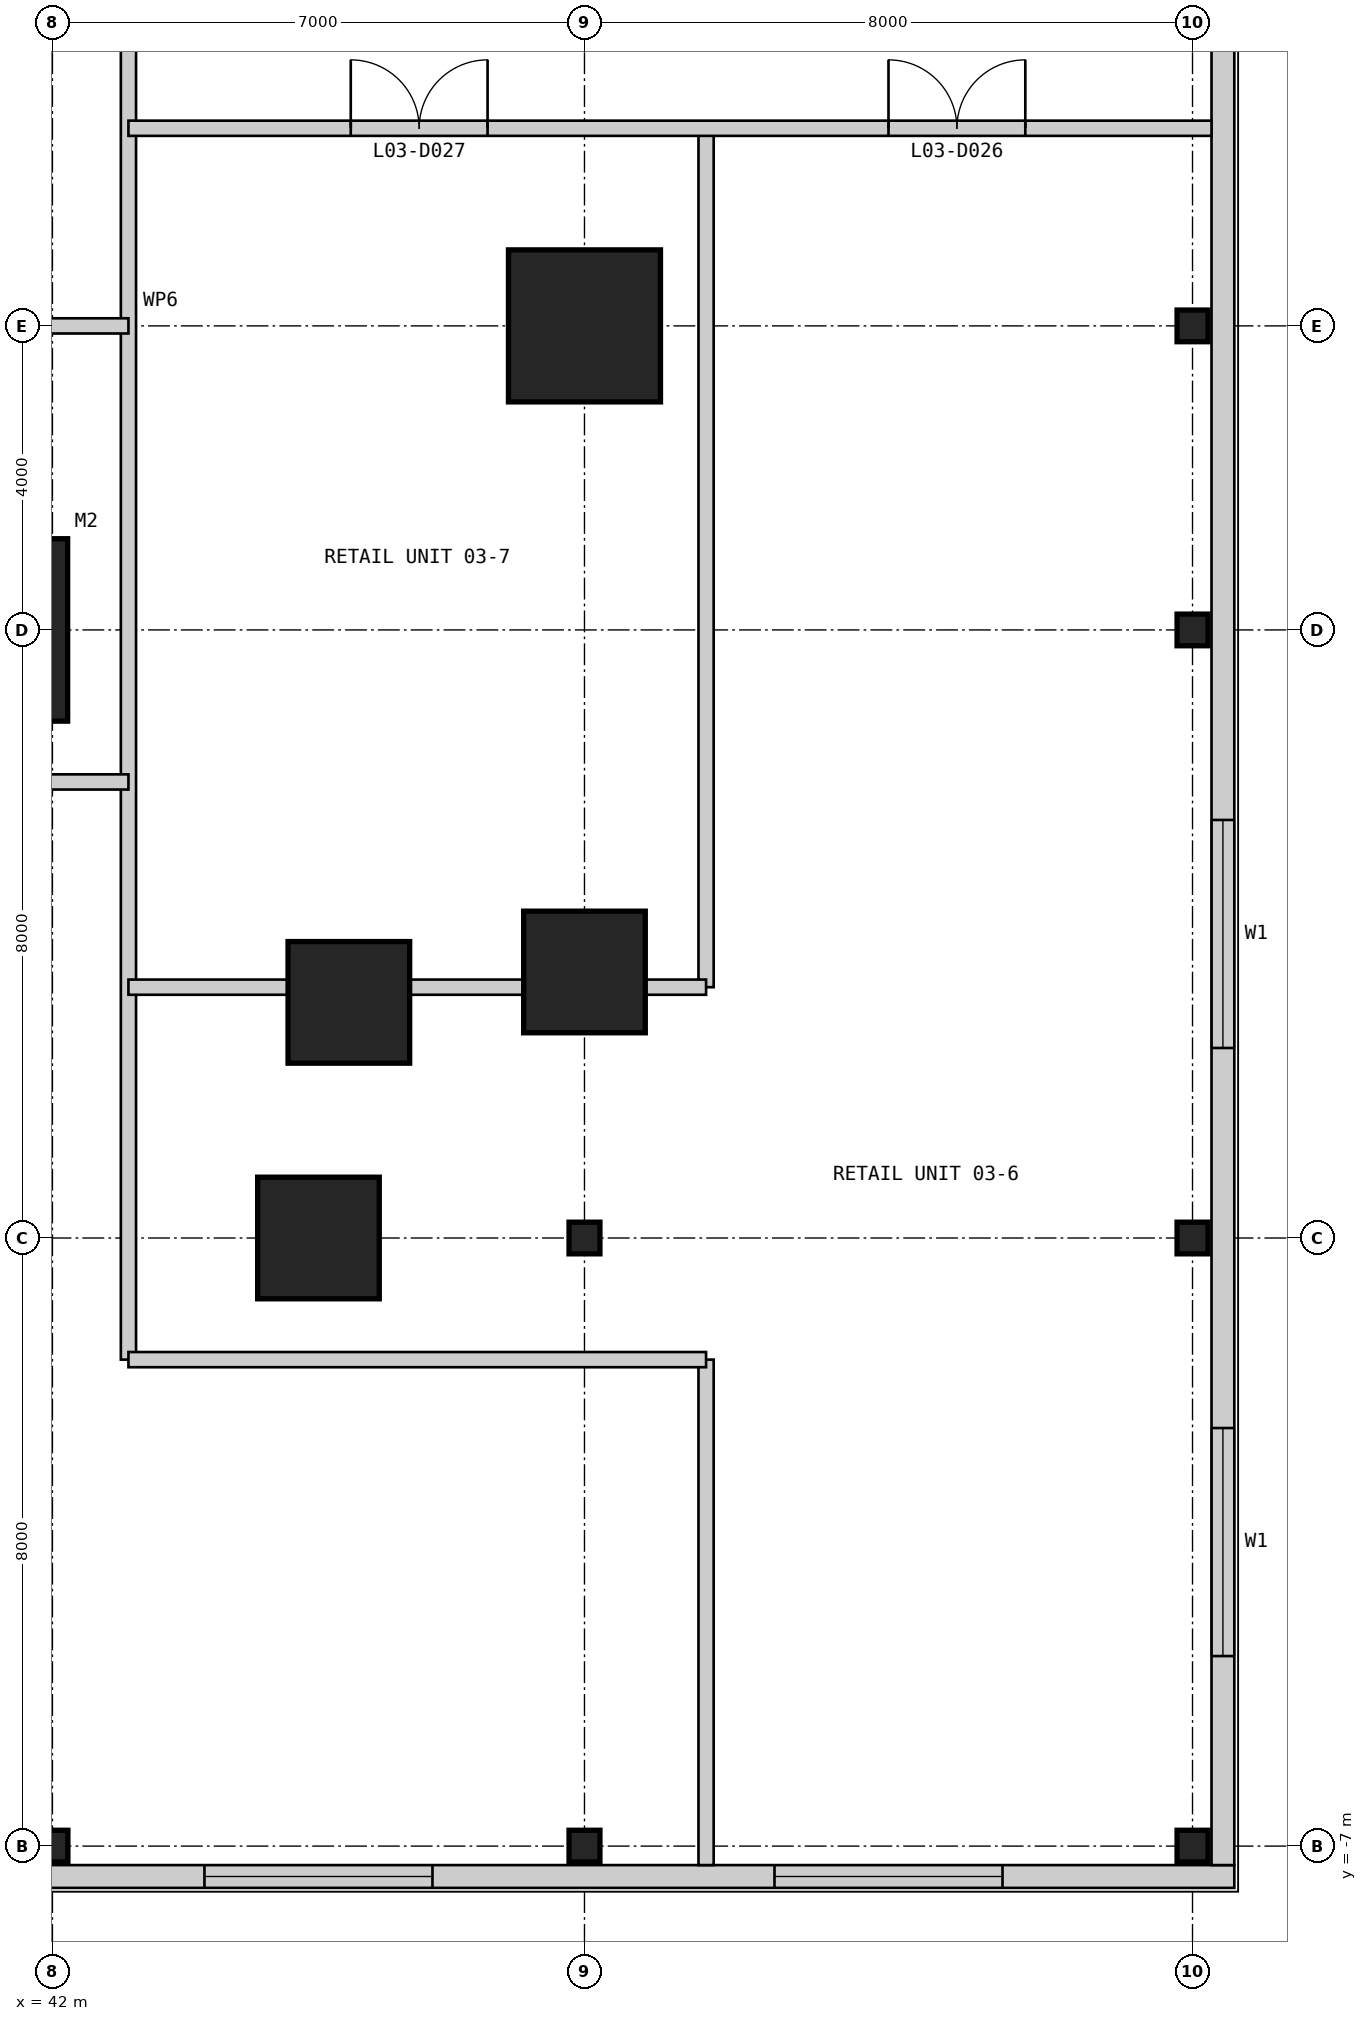
"""IFC4 building model, lengths in metres.
Left out: names, types, materials, properties, quantities, classifications, styles, units other than length and angle.
Written with IfcOpenShell. Run it as: python <this file> out.ifc"""

import sys

from ifc_helpers import new_model, si_unit, direction, frame, frame_2d, origin, origin_2d, place, context, subcontext, project, spatial, rectangle, i_section, extrude, element, fill, save


model = new_model("IFC4")
c1 = context("Model", 3, precision=1e-05, world=origin(), true_north=direction((0.0, 1.0)))
c2 = subcontext(c1, "Body", "Model", "MODEL_VIEW")
j1 = project(units=[si_unit("LENGTHUNIT", "METRE"), si_unit("PLANEANGLEUNIT", "RADIAN")], contexts=[c1])
p1 = place(None, origin())
s1 = spatial("IfcSite", under=j1, at=p1, CompositionType="ELEMENT")
p2 = place(p1, origin())
s2 = spatial("IfcBuilding", under=s1, at=p2, CompositionType="ELEMENT")
p3 = place(p2, frame((0.0, 0.0, 16.6)))
s3 = spatial("IfcBuildingStorey", under=s2, at=p3, CompositionType="ELEMENT", Elevation=16.6)
p4 = place(p3, frame((41.0, 9.0, 0.0), z_axis=(0.0, 0.0, 1.0), x_axis=(1.0, 0.0, 0.0)))
e1 = element("IfcColumn", 1, at=p4, inside=s3, PredefinedType="COLUMN", context=c2, shape_type="SweptSolid", body=[
    extrude(rectangle(XDim=2.4, YDim=2.4, at=origin_2d()), origin(), (0.0, 0.0, 1.0), 4.8),
])
for number, where, z_axis, x_axis in (
    (2, (45.5, 1.0, 0.0), (0.0, 0.0, 1.0), (1.0, 0.0, 0.0)),
    (3, (45.9, 4.1, 0.0), (0.0, 0.0, 1.0), (1.0, 0.0, 0.0)),
    (4, (49.0, 4.5, 0.0), (0.0, 0.0, 1.0), (1.0, 0.0, 0.0)),
):
    element("IfcColumn", number, at=place(p3, frame(where, z_axis=z_axis, x_axis=x_axis)), inside=s3, PredefinedType="COLUMN", context=c2, shape_type="SweptSolid", body=[
        extrude(rectangle(XDim=1.6, YDim=1.6, at=origin_2d()), origin(), (0.0, 0.0, 1.0), 4.8),
    ])
p5 = place(p3, frame((49.0, 13.0, 0.0), z_axis=(0.0, 0.0, 1.0), x_axis=(1.0, 0.0, 0.0)))
e5 = element("IfcColumn", 5, at=p5, inside=s3, PredefinedType="COLUMN", context=c2, shape_type="SweptSolid", body=[
    extrude(rectangle(XDim=2.0, YDim=2.0, at=origin_2d()), origin(), (0.0, 0.0, 1.0), 4.8),
])
for number, where, z_axis, x_axis in (
    (6, (42.0, -7.0, 0.0), (0.0, 0.0, 1.0), (1.0, 0.0, 0.0)),
    (7, (49.0, -7.0, 0.0), (0.0, 0.0, 1.0), (1.0, 0.0, 0.0)),
    (8, (49.0, 1.0, 0.0), (0.0, 0.0, 1.0), (1.0, 0.0, 0.0)),
    (9, (57.0, -7.0, 0.0), (0.0, 0.0, 1.0), (1.0, 0.0, 0.0)),
    (10, (57.0, 1.0, 0.0), (0.0, 0.0, 1.0), (1.0, 0.0, 0.0)),
    (11, (57.0, 9.0, 0.0), (0.0, 0.0, 1.0), (1.0, 0.0, 0.0)),
    (12, (57.0, 13.0, 0.0), (0.0, 0.0, 1.0), (1.0, 0.0, 0.0)),
):
    element("IfcColumn", number, at=place(p3, frame(where, z_axis=z_axis, x_axis=x_axis)), inside=s3, PredefinedType="COLUMN", context=c2, shape_type="SweptSolid", body=[
        extrude(i_section(OverallWidth=0.406, OverallDepth=0.417, WebThickness=0.03, FlangeThickness=0.048, at=origin_2d()), origin(), (0.0, 0.0, 1.0), 4.8),
    ])
p6 = place(p3, frame((-15.55, -7.4, 0.0), z_axis=(0.0, 0.0, 1.0), x_axis=(1.0, 0.0, 0.0)))
e13 = element("IfcWall", 13, at=p6, inside=s3, PredefinedType="SOLIDWALL", context=c2, shape_type="SweptSolid", body=[
    extrude(rectangle(XDim=73.1, YDim=0.3, at=frame_2d((36.55, 0.0))), origin(), (0.0, 0.0, 1.0), 4.5),
])
p7 = place(p6, frame((3.05, 0.0, 0.9)))
e14 = element("IfcOpeningElement", 14, at=p7, cuts=e13, PredefinedType="OPENING", context=c2, shape_type="SweptSolid", body=[
    extrude(rectangle(XDim=3.0, YDim=2.4, at=frame_2d((1.5, 1.2))), frame((0.0, 0.16, 0.0), z_axis=(0.0, -1.0, 0.0), x_axis=(1.0, 0.0, 0.0)), (0.0, 0.0, 1.0), 0.32),
])
p8 = place(p6, frame((11.05, 0.0, 0.9)))
e15 = element("IfcOpeningElement", 15, at=p8, cuts=e13, PredefinedType="OPENING", context=c2, shape_type="SweptSolid", body=[
    extrude(rectangle(XDim=3.0, YDim=2.4, at=frame_2d((1.5, 1.2))), frame((0.0, 0.16, 0.0), z_axis=(0.0, -1.0, 0.0), x_axis=(1.0, 0.0, 0.0)), (0.0, 0.0, 1.0), 0.32),
])
p9 = place(p6, frame((19.05, 0.0, 0.9)))
e16 = element("IfcOpeningElement", 16, at=p9, cuts=e13, PredefinedType="OPENING", context=c2, shape_type="SweptSolid", body=[
    extrude(rectangle(XDim=3.0, YDim=2.4, at=frame_2d((1.5, 1.2))), frame((0.0, 0.16, 0.0), z_axis=(0.0, -1.0, 0.0), x_axis=(1.0, 0.0, 0.0)), (0.0, 0.0, 1.0), 0.32),
])
p10 = place(p6, frame((33.05, 0.0, 0.9)))
e17 = element("IfcOpeningElement", 17, at=p10, cuts=e13, PredefinedType="OPENING", context=c2, shape_type="SweptSolid", body=[
    extrude(rectangle(XDim=3.0, YDim=2.4, at=frame_2d((1.5, 1.2))), frame((0.0, 0.16, 0.0), z_axis=(0.0, -1.0, 0.0), x_axis=(1.0, 0.0, 0.0)), (0.0, 0.0, 1.0), 0.32),
])
p11 = place(p6, frame((45.05, 0.0, 0.9)))
e18 = element("IfcOpeningElement", 18, at=p11, cuts=e13, PredefinedType="OPENING", context=c2, shape_type="SweptSolid", body=[
    extrude(rectangle(XDim=3.0, YDim=2.4, at=frame_2d((1.5, 1.2))), frame((0.0, 0.16, 0.0), z_axis=(0.0, -1.0, 0.0), x_axis=(1.0, 0.0, 0.0)), (0.0, 0.0, 1.0), 0.32),
])
p12 = place(p6, frame((53.55, 0.0, 0.9)))
e19 = element("IfcOpeningElement", 19, at=p12, cuts=e13, PredefinedType="OPENING", context=c2, shape_type="SweptSolid", body=[
    extrude(rectangle(XDim=3.0, YDim=2.4, at=frame_2d((1.5, 1.2))), frame((0.0, 0.16, 0.0), z_axis=(0.0, -1.0, 0.0), x_axis=(1.0, 0.0, 0.0)), (0.0, 0.0, 1.0), 0.32),
])
p13 = place(p6, frame((59.55, 0.0, 0.9)))
e20 = element("IfcOpeningElement", 20, at=p13, cuts=e13, PredefinedType="OPENING", context=c2, shape_type="SweptSolid", body=[
    extrude(rectangle(XDim=3.0, YDim=2.4, at=frame_2d((1.5, 1.2))), frame((0.0, 0.16, 0.0), z_axis=(0.0, -1.0, 0.0), x_axis=(1.0, 0.0, 0.0)), (0.0, 0.0, 1.0), 0.32),
])
p14 = place(p6, frame((67.05, 0.0, 0.9)))
e21 = element("IfcOpeningElement", 21, at=p14, cuts=e13, PredefinedType="OPENING", context=c2, shape_type="SweptSolid", body=[
    extrude(rectangle(XDim=3.0, YDim=2.4, at=frame_2d((1.5, 1.2))), frame((0.0, 0.16, 0.0), z_axis=(0.0, -1.0, 0.0), x_axis=(1.0, 0.0, 0.0)), (0.0, 0.0, 1.0), 0.32),
])
p15 = place(p3, frame((57.4, -7.25, 0.0), z_axis=(0.0, 0.0, 1.0), x_axis=(0.0, 1.0, 0.0)))
e22 = element("IfcWall", 22, at=p15, inside=s3, PredefinedType="SOLIDWALL", context=c2, shape_type="SweptSolid", body=[
    extrude(rectangle(XDim=72.5, YDim=0.3, at=frame_2d((36.25, 0.0))), origin(), (0.0, 0.0, 1.0), 4.5),
])
p16 = place(p15, frame((2.75, 0.0, 0.9)))
e23 = element("IfcOpeningElement", 23, at=p16, cuts=e22, PredefinedType="OPENING", context=c2, shape_type="SweptSolid", body=[
    extrude(rectangle(XDim=3.0, YDim=2.4, at=frame_2d((1.5, 1.2))), frame((0.0, 0.16, 0.0), z_axis=(0.0, -1.0, 0.0), x_axis=(1.0, 0.0, 0.0)), (0.0, 0.0, 1.0), 0.32),
])
p17 = place(p15, frame((10.75, 0.0, 0.9)))
e24 = element("IfcOpeningElement", 24, at=p17, cuts=e22, PredefinedType="OPENING", context=c2, shape_type="SweptSolid", body=[
    extrude(rectangle(XDim=3.0, YDim=2.4, at=frame_2d((1.5, 1.2))), frame((0.0, 0.16, 0.0), z_axis=(0.0, -1.0, 0.0), x_axis=(1.0, 0.0, 0.0)), (0.0, 0.0, 1.0), 0.32),
])
p18 = place(p15, frame((24.75, 0.0, 0.9)))
e25 = element("IfcOpeningElement", 25, at=p18, cuts=e22, PredefinedType="OPENING", context=c2, shape_type="SweptSolid", body=[
    extrude(rectangle(XDim=3.0, YDim=2.4, at=frame_2d((1.5, 1.2))), frame((0.0, 0.16, 0.0), z_axis=(0.0, -1.0, 0.0), x_axis=(1.0, 0.0, 0.0)), (0.0, 0.0, 1.0), 0.32),
])
p19 = place(p15, frame((36.75, 0.0, 0.9)))
e26 = element("IfcOpeningElement", 26, at=p19, cuts=e22, PredefinedType="OPENING", context=c2, shape_type="SweptSolid", body=[
    extrude(rectangle(XDim=3.0, YDim=2.4, at=frame_2d((1.5, 1.2))), frame((0.0, 0.16, 0.0), z_axis=(0.0, -1.0, 0.0), x_axis=(1.0, 0.0, 0.0)), (0.0, 0.0, 1.0), 0.32),
])
p20 = place(p15, frame((45.25, 0.0, 0.9)))
e27 = element("IfcOpeningElement", 27, at=p20, cuts=e22, PredefinedType="OPENING", context=c2, shape_type="SweptSolid", body=[
    extrude(rectangle(XDim=3.0, YDim=2.4, at=frame_2d((1.5, 1.2))), frame((0.0, 0.16, 0.0), z_axis=(0.0, -1.0, 0.0), x_axis=(1.0, 0.0, 0.0)), (0.0, 0.0, 1.0), 0.32),
])
p21 = place(p15, frame((51.25, 0.0, 0.9)))
e28 = element("IfcOpeningElement", 28, at=p21, cuts=e22, PredefinedType="OPENING", context=c2, shape_type="SweptSolid", body=[
    extrude(rectangle(XDim=3.0, YDim=2.4, at=frame_2d((1.5, 1.2))), frame((0.0, 0.16, 0.0), z_axis=(0.0, -1.0, 0.0), x_axis=(1.0, 0.0, 0.0)), (0.0, 0.0, 1.0), 0.32),
])
p22 = place(p15, frame((58.75, 0.0, 0.9)))
e29 = element("IfcOpeningElement", 29, at=p22, cuts=e22, PredefinedType="OPENING", context=c2, shape_type="SweptSolid", body=[
    extrude(rectangle(XDim=3.0, YDim=2.4, at=frame_2d((1.5, 1.2))), frame((0.0, 0.16, 0.0), z_axis=(0.0, -1.0, 0.0), x_axis=(1.0, 0.0, 0.0)), (0.0, 0.0, 1.0), 0.32),
])
p23 = place(p15, frame((66.75, 0.0, 0.9)))
e30 = element("IfcOpeningElement", 30, at=p23, cuts=e22, PredefinedType="OPENING", context=c2, shape_type="SweptSolid", body=[
    extrude(rectangle(XDim=3.0, YDim=2.4, at=frame_2d((1.5, 1.2))), frame((0.0, 0.16, 0.0), z_axis=(0.0, -1.0, 0.0), x_axis=(1.0, 0.0, 0.0)), (0.0, 0.0, 1.0), 0.32),
])
p24 = place(p3, frame((43.0, -0.6, 0.0), z_axis=(0.0, 0.0, 1.0), x_axis=(0.0, 1.0, 0.0)))
e31 = element("IfcWall", 31, at=p24, inside=s3, PredefinedType="PARTITIONING", context=c2, shape_type="SweptSolid", body=[
    extrude(rectangle(XDim=28.6, YDim=0.2, at=frame_2d((14.3, 0.0))), origin(), (0.0, 0.0, 1.0), 3.843),
])
p25 = place(p3, frame((50.6, -7.25, 0.0), z_axis=(0.0, 0.0, 1.0), x_axis=(0.0, 1.0, 0.0)))
e32 = element("IfcWall", 32, at=p25, inside=s3, PredefinedType="PARTITIONING", context=c2, shape_type="SweptSolid", body=[
    extrude(rectangle(XDim=6.65, YDim=0.2, at=frame_2d((3.325, 0.0))), origin(), (0.0, 0.0, 1.0), 4.5),
])
p26 = place(p3, frame((50.6, 4.3, 0.0), z_axis=(0.0, 0.0, 1.0), x_axis=(0.0, 1.0, 0.0)))
e33 = element("IfcWall", 33, at=p26, inside=s3, PredefinedType="PARTITIONING", context=c2, shape_type="SweptSolid", body=[
    extrude(rectangle(XDim=11.3, YDim=0.2, at=frame_2d((5.65, 0.0))), origin(), (0.0, 0.0, 1.0), 4.5),
])
p27 = place(p3, frame((43.0, -0.6, 0.0), z_axis=(0.0, 0.0, 1.0), x_axis=(1.0, 0.0, 0.0)))
e34 = element("IfcWall", 34, at=p27, inside=s3, PredefinedType="PARTITIONING", context=c2, shape_type="SweptSolid", body=[
    extrude(rectangle(XDim=7.6, YDim=0.2, at=frame_2d((3.8, 0.0))), origin(), (0.0, 0.0, 1.0), 4.5),
])
p28 = place(p3, frame((43.0, 4.3, 0.0), z_axis=(0.0, 0.0, 1.0), x_axis=(1.0, 0.0, 0.0)))
e35 = element("IfcWall", 35, at=p28, inside=s3, PredefinedType="PARTITIONING", context=c2, shape_type="SweptSolid", body=[
    extrude(rectangle(XDim=2.1, YDim=0.2, at=frame_2d((1.05, 0.0))), origin(), (0.0, 0.0, 1.0), 4.5),
])
p29 = place(p3, frame((46.7, 4.3, 0.0), z_axis=(0.0, 0.0, 1.0), x_axis=(1.0, 0.0, 0.0)))
e36 = element("IfcWall", 36, at=p29, inside=s3, PredefinedType="PARTITIONING", context=c2, shape_type="SweptSolid", body=[
    extrude(rectangle(XDim=1.5, YDim=0.2, at=frame_2d((0.75, 0.0))), origin(), (0.0, 0.0, 1.0), 3.65),
])
p30 = place(p3, frame((49.8, 4.3, 0.0), z_axis=(0.0, 0.0, 1.0), x_axis=(1.0, 0.0, 0.0)))
e37 = element("IfcWall", 37, at=p30, inside=s3, PredefinedType="PARTITIONING", context=c2, shape_type="SweptSolid", body=[
    extrude(rectangle(XDim=0.8, YDim=0.2, at=frame_2d((0.4, 0.0))), origin(), (0.0, 0.0, 1.0), 4.5),
])
p31 = place(p3, frame((34.4, 7.0, 0.0), z_axis=(0.0, 0.0, 1.0), x_axis=(1.0, 0.0, 0.0)))
e38 = element("IfcWall", 38, at=p31, inside=s3, PredefinedType="PARTITIONING", context=c2, shape_type="SweptSolid", body=[
    extrude(rectangle(XDim=8.6, YDim=0.2, at=frame_2d((4.3, 0.0))), origin(), (0.0, 0.0, 1.0), 4.5),
])
p32 = place(p3, frame((37.0, 13.0, 0.0), z_axis=(0.0, 0.0, 1.0), x_axis=(1.0, 0.0, 0.0)))
e39 = element("IfcWall", 39, at=p32, inside=s3, PredefinedType="PARTITIONING", context=c2, shape_type="SweptSolid", body=[
    extrude(rectangle(XDim=6.0, YDim=0.2, at=frame_2d((3.0, 0.0))), origin(), (0.0, 0.0, 1.0), 3.653),
])
p33 = place(p3, frame((43.0, 15.6, 0.0), z_axis=(0.0, 0.0, 1.0), x_axis=(1.0, 0.0, 0.0)))
e40 = element("IfcWall", 40, at=p33, inside=s3, PredefinedType="PARTITIONING", context=c2, shape_type="SweptSolid", body=[
    extrude(rectangle(XDim=14.25, YDim=0.2, at=frame_2d((7.125, 0.0))), origin(), (0.0, 0.0, 1.0), 4.5),
])
p34 = place(p33, frame((10.0, 0.0, 0.0)))
e41 = element("IfcOpeningElement", 41, at=p34, cuts=e40, PredefinedType="OPENING", context=c2, shape_type="SweptSolid", body=[
    extrude(rectangle(XDim=1.8, YDim=2.4, at=frame_2d((0.9, 1.2))), frame((0.0, 0.11, 0.0), z_axis=(0.0, -1.0, 0.0), x_axis=(1.0, 0.0, 0.0)), (0.0, 0.0, 1.0), 0.22),
])
p35 = place(p33, frame((2.925, 0.0, 0.0)))
e42 = element("IfcOpeningElement", 42, at=p35, cuts=e40, PredefinedType="OPENING", context=c2, shape_type="SweptSolid", body=[
    extrude(rectangle(XDim=1.8, YDim=2.4, at=frame_2d((0.9, 1.2))), frame((0.0, 0.11, 0.0), z_axis=(0.0, -1.0, 0.0), x_axis=(1.0, 0.0, 0.0)), (0.0, 0.0, 1.0), 0.22),
])
p36 = place(p13, origin())
e43 = element("IfcWindow", 43, at=p36, inside=s3, PartitioningType="SINGLE_PANEL", PredefinedType="WINDOW", context=c2, shape_type="SweptSolid", body=[
    extrude(rectangle(XDim=3.0, YDim=2.4, at=frame_2d((1.5, 1.2))), frame((0.0, 0.03, 0.0), z_axis=(0.0, -1.0, 0.0), x_axis=(1.0, 0.0, 0.0)), (0.0, 0.0, 1.0), 0.06),
])
fill(e20, e43)
p37 = place(p14, origin())
e44 = element("IfcWindow", 44, at=p37, inside=s3, PartitioningType="SINGLE_PANEL", PredefinedType="WINDOW", context=c2, shape_type="SweptSolid", body=[
    extrude(rectangle(XDim=3.0, YDim=2.4, at=frame_2d((1.5, 1.2))), frame((0.0, 0.03, 0.0), z_axis=(0.0, -1.0, 0.0), x_axis=(1.0, 0.0, 0.0)), (0.0, 0.0, 1.0), 0.06),
])
fill(e21, e44)
p38 = place(p16, origin())
e45 = element("IfcWindow", 45, at=p38, inside=s3, PartitioningType="SINGLE_PANEL", PredefinedType="WINDOW", context=c2, shape_type="SweptSolid", body=[
    extrude(rectangle(XDim=3.0, YDim=2.4, at=frame_2d((1.5, 1.2))), frame((0.0, 0.03, 0.0), z_axis=(0.0, -1.0, 0.0), x_axis=(1.0, 0.0, 0.0)), (0.0, 0.0, 1.0), 0.06),
])
fill(e23, e45)
p39 = place(p17, origin())
e46 = element("IfcWindow", 46, at=p39, inside=s3, PartitioningType="SINGLE_PANEL", PredefinedType="WINDOW", context=c2, shape_type="SweptSolid", body=[
    extrude(rectangle(XDim=3.0, YDim=2.4, at=frame_2d((1.5, 1.2))), frame((0.0, 0.03, 0.0), z_axis=(0.0, -1.0, 0.0), x_axis=(1.0, 0.0, 0.0)), (0.0, 0.0, 1.0), 0.06),
])
fill(e24, e46)
p40 = place(p34, origin())
e47 = element("IfcDoor", 47, at=p40, inside=s3, OperationType="DOUBLE_DOOR_SINGLE_SWING", PredefinedType="DOOR", context=c2, shape_type="SweptSolid", body=[
    extrude(rectangle(XDim=1.8, YDim=2.4, at=frame_2d((0.9, 1.2))), frame((0.0, 0.025, 0.0), z_axis=(0.0, -1.0, 0.0), x_axis=(1.0, 0.0, 0.0)), (0.0, 0.0, 1.0), 0.05),
])
fill(e41, e47)
p41 = place(p35, origin())
e48 = element("IfcDoor", 48, at=p41, inside=s3, OperationType="DOUBLE_DOOR_SINGLE_SWING", PredefinedType="DOOR", context=c2, shape_type="SweptSolid", body=[
    extrude(rectangle(XDim=1.8, YDim=2.4, at=frame_2d((0.9, 1.2))), frame((0.0, 0.025, 0.0), z_axis=(0.0, -1.0, 0.0), x_axis=(1.0, 0.0, 0.0)), (0.0, 0.0, 1.0), 0.05),
])
fill(e42, e48)
save(model, sys.argv[1])
